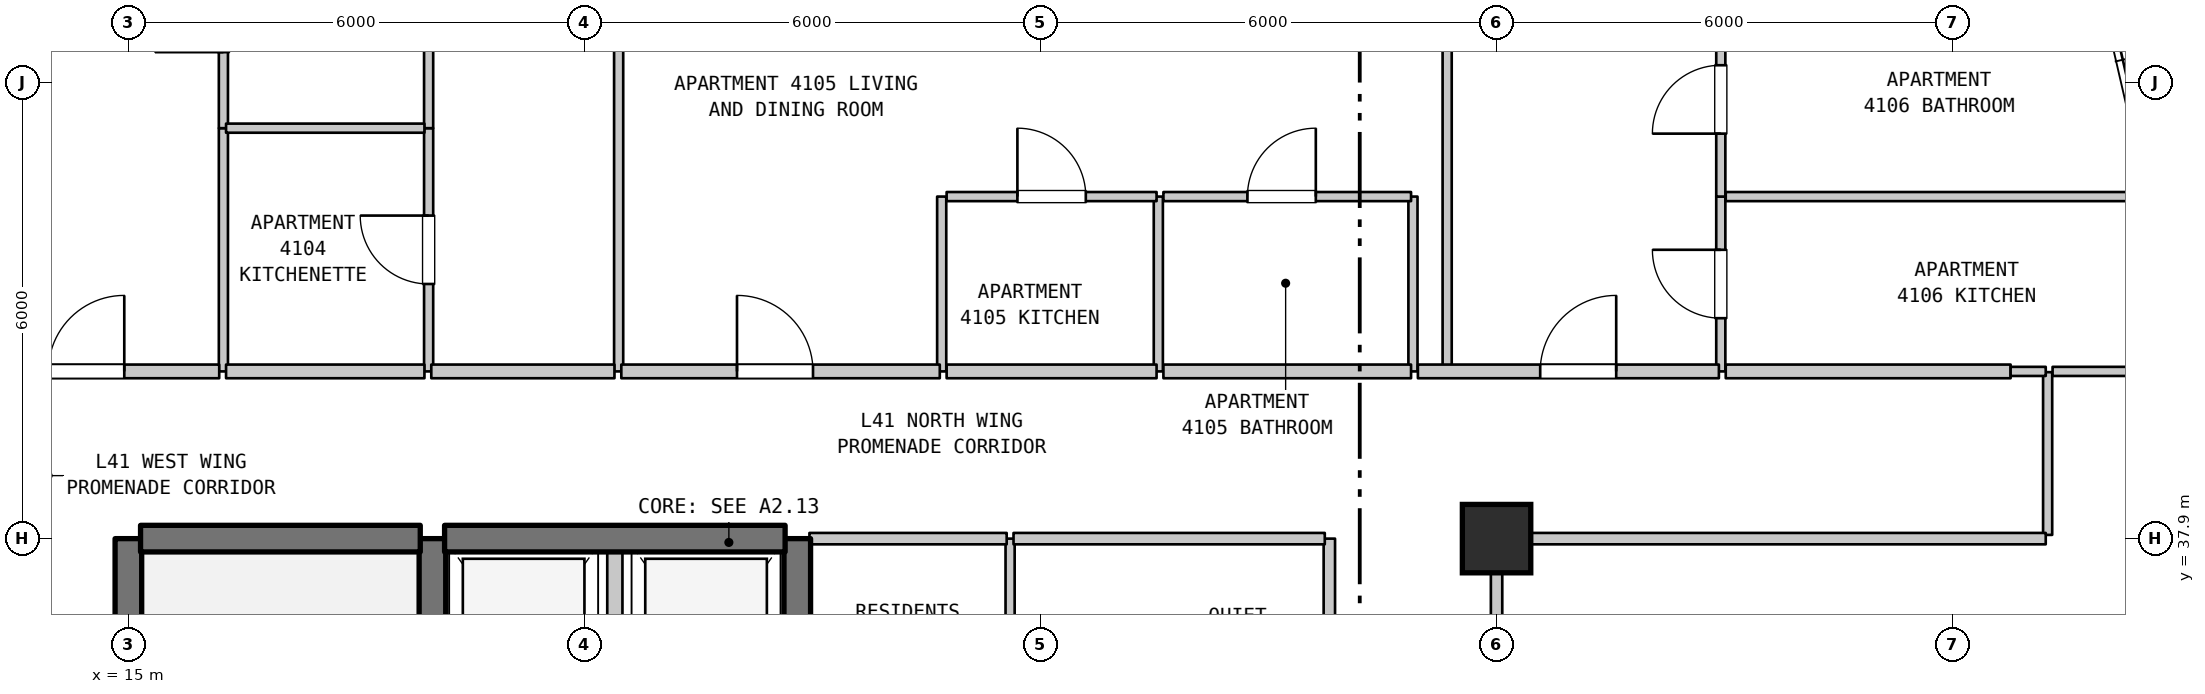
"""IFC4 building model, lengths in metres.
Left out: names, types, materials, properties, quantities, classifications, styles, units other than length and angle.
Written with IfcOpenShell. Run it as: python <this file> out.ifc"""

import sys

from ifc_helpers import new_model, si_unit, direction, frame, frame_2d, origin, origin_2d, place, context, subcontext, project, spatial, rectangle, extrude, element, fill, save


model = new_model("IFC4")
c1 = context("Model", 3, precision=1e-05, world=origin(), true_north=direction((0.0, 1.0)))
c2 = subcontext(c1, "Body", "Model", "MODEL_VIEW")
j1 = project(units=[si_unit("LENGTHUNIT", "METRE"), si_unit("PLANEANGLEUNIT", "RADIAN")], contexts=[c1])
p1 = place(None, origin())
s1 = spatial("IfcSite", under=j1, at=p1, CompositionType="ELEMENT")
p2 = place(p1, origin())
s2 = spatial("IfcBuilding", under=s1, at=p2, CompositionType="ELEMENT")
p3 = place(p2, frame((0.0, 0.0, 169.1)))
s3 = spatial("IfcBuildingStorey", under=s2, at=p3, CompositionType="ELEMENT", Elevation=169.1)
p4 = place(p3, frame((33.0, 37.9, 0.0), z_axis=(0.0, 0.0, 1.0), x_axis=(1.0, 0.0, 0.0)))
e1 = element("IfcColumn", 1, at=p4, inside=s3, PredefinedType="COLUMN", context=c2, shape_type="SweptSolid", body=[
    extrude(rectangle(XDim=0.9, YDim=0.9, at=origin_2d()), origin(), (0.0, 0.0, 1.0), 3.7),
])
p5 = place(p3, frame((15.0, 31.1, 0.0), z_axis=(0.0, 0.0, 1.0), x_axis=(0.0, 1.0, 0.0)))
e2 = element("IfcWall", 2, at=p5, inside=s3, PredefinedType="SHEAR", context=c2, shape_type="SweptSolid", body=[
    extrude(rectangle(XDim=6.8, YDim=0.35, at=frame_2d((3.4, 0.0))), origin(), (0.0, 0.0, 1.0), 3.39),
])
p6 = place(p3, frame((16.25, 40.1, 0.0), z_axis=(0.0, 0.0, 1.0), x_axis=(0.0, 1.0, 0.0)))
e3 = element("IfcWall", 3, at=p6, inside=s3, PredefinedType="PARTITIONING", context=c2, shape_type="SweptSolid", body=[
    extrude(rectangle(XDim=3.2, YDim=0.12, at=frame_2d((1.6, 0.0))), origin(), (0.0, 0.0, 1.0), 3.39),
])
p7 = place(p3, frame((16.25, 43.3, 0.0), z_axis=(0.0, 0.0, 1.0), x_axis=(0.0, 1.0, 0.0)))
e4 = element("IfcWall", 4, at=p7, inside=s3, PredefinedType="PARTITIONING", context=c2, shape_type="SweptSolid", body=[
    extrude(rectangle(XDim=2.9, YDim=0.12, at=frame_2d((1.45, 0.0))), origin(), (0.0, 0.0, 1.0), 3.39),
])
p8 = place(p7, frame((1.0, 0.0, 0.0)))
e5 = element("IfcOpeningElement", 5, at=p8, cuts=e4, PredefinedType="OPENING", context=c2, shape_type="SweptSolid", body=[
    extrude(rectangle(XDim=0.9, YDim=2.1, at=frame_2d((0.45, 1.05))), frame((0.0, 0.07, 0.0), z_axis=(0.0, -1.0, 0.0), x_axis=(1.0, 0.0, 0.0)), (0.0, 0.0, 1.0), 0.14),
])
p9 = place(p3, frame((18.95, 40.1, 0.0), z_axis=(0.0, 0.0, 1.0), x_axis=(0.0, 1.0, 0.0)))
e6 = element("IfcWall", 6, at=p9, inside=s3, PredefinedType="PARTITIONING", context=c2, shape_type="SweptSolid", body=[
    extrude(rectangle(XDim=3.2, YDim=0.12, at=frame_2d((1.6, 0.0))), origin(), (0.0, 0.0, 1.0), 3.39),
])
p10 = place(p9, frame((1.15, 0.0, 0.0)))
e7 = element("IfcOpeningElement", 7, at=p10, cuts=e6, PredefinedType="OPENING", context=c2, shape_type="SweptSolid", body=[
    extrude(rectangle(XDim=0.9, YDim=2.15, at=frame_2d((0.45, 1.075))), frame((0.0, 0.07, 0.0), z_axis=(0.0, -1.0, 0.0), x_axis=(1.0, 0.0, 0.0)), (0.0, 0.0, 1.0), 0.14),
])
p11 = place(p3, frame((18.95, 43.3, 0.0), z_axis=(0.0, 0.0, 1.0), x_axis=(0.0, 1.0, 0.0)))
e8 = element("IfcWall", 8, at=p11, inside=s3, PredefinedType="PARTITIONING", context=c2, shape_type="SweptSolid", body=[
    extrude(rectangle(XDim=2.9, YDim=0.12, at=frame_2d((1.45, 0.0))), origin(), (0.0, 0.0, 1.0), 3.39),
])
p12 = place(p3, frame((19.0, 35.0, 0.0), z_axis=(0.0, 0.0, 1.0), x_axis=(0.0, 1.0, 0.0)))
e9 = element("IfcWall", 9, at=p12, inside=s3, PredefinedType="SHEAR", context=c2, shape_type="SweptSolid", body=[
    extrude(rectangle(XDim=2.9, YDim=0.35, at=frame_2d((1.45, 0.0))), origin(), (0.0, 0.0, 1.0), 3.39),
])
p13 = place(p3, frame((21.4, 35.0, 0.0), z_axis=(0.0, 0.0, 1.0), x_axis=(0.0, 1.0, 0.0)))
e10 = element("IfcWall", 10, at=p13, inside=s3, PredefinedType="STANDARD", context=c2, shape_type="SweptSolid", body=[
    extrude(rectangle(XDim=2.9, YDim=0.2, at=frame_2d((1.45, 0.0))), origin(), (0.0, 0.0, 1.0), 3.39),
])
p14 = place(p3, frame((21.45, 40.1, 0.0), z_axis=(0.0, 0.0, 1.0), x_axis=(0.0, 1.0, 0.0)))
e11 = element("IfcWall", 11, at=p14, inside=s3, PredefinedType="PARTITIONING", context=c2, shape_type="SweptSolid", body=[
    extrude(rectangle(XDim=13.79, YDim=0.12, at=frame_2d((6.895, 0.0))), origin(), (0.0, 0.0, 1.0), 3.39),
])
p15 = place(p3, frame((23.8, 35.0, 0.0), z_axis=(0.0, 0.0, 1.0), x_axis=(0.0, 1.0, 0.0)))
e12 = element("IfcWall", 12, at=p15, inside=s3, PredefinedType="SHEAR", context=c2, shape_type="SweptSolid", body=[
    extrude(rectangle(XDim=2.9, YDim=0.35, at=frame_2d((1.45, 0.0))), origin(), (0.0, 0.0, 1.0), 3.39),
])
p16 = place(p3, frame((25.7, 40.1, 0.0), z_axis=(0.0, 0.0, 1.0), x_axis=(0.0, 1.0, 0.0)))
e13 = element("IfcWall", 13, at=p16, inside=s3, PredefinedType="PARTITIONING", context=c2, shape_type="SweptSolid", body=[
    extrude(rectangle(XDim=2.3, YDim=0.12, at=frame_2d((1.15, 0.0))), origin(), (0.0, 0.0, 1.0), 3.39),
])
p17 = place(p3, frame((26.6, 35.0, 0.0), z_axis=(0.0, 0.0, 1.0), x_axis=(0.0, 1.0, 0.0)))
e14 = element("IfcWall", 14, at=p17, inside=s3, PredefinedType="PARTITIONING", context=c2, shape_type="SweptSolid", body=[
    extrude(rectangle(XDim=2.9, YDim=0.12, at=frame_2d((1.45, 0.0))), origin(), (0.0, 0.0, 1.0), 3.39),
])
p18 = place(p3, frame((28.55, 40.1, 0.0), z_axis=(0.0, 0.0, 1.0), x_axis=(0.0, 1.0, 0.0)))
e15 = element("IfcWall", 15, at=p18, inside=s3, PredefinedType="PARTITIONING", context=c2, shape_type="SweptSolid", body=[
    extrude(rectangle(XDim=2.3, YDim=0.12, at=frame_2d((1.15, 0.0))), origin(), (0.0, 0.0, 1.0), 3.39),
])
p19 = place(p3, frame((30.8, 35.0, 0.0), z_axis=(0.0, 0.0, 1.0), x_axis=(0.0, 1.0, 0.0)))
e16 = element("IfcWall", 16, at=p19, inside=s3, PredefinedType="STANDARD", context=c2, shape_type="SweptSolid", body=[
    extrude(rectangle(XDim=2.9, YDim=0.15, at=frame_2d((1.45, 0.0))), origin(), (0.0, 0.0, 1.0), 3.39),
])
p20 = place(p3, frame((31.9, 40.1, 0.0), z_axis=(0.0, 0.0, 1.0), x_axis=(0.0, 1.0, 0.0)))
e17 = element("IfcWall", 17, at=p20, inside=s3, PredefinedType="PARTITIONING", context=c2, shape_type="SweptSolid", body=[
    extrude(rectangle(XDim=2.3, YDim=0.12, at=frame_2d((1.15, 0.0))), origin(), (0.0, 0.0, 1.0), 3.39),
])
p21 = place(p3, frame((32.35, 40.1, 0.0), z_axis=(0.0, 0.0, 1.0), x_axis=(0.0, 1.0, 0.0)))
e18 = element("IfcWall", 18, at=p21, inside=s3, PredefinedType="PARTITIONING", context=c2, shape_type="SweptSolid", body=[
    extrude(rectangle(XDim=13.79, YDim=0.12, at=frame_2d((6.895, 0.0))), origin(), (0.0, 0.0, 1.0), 3.39),
])
p22 = place(p3, frame((35.95, 40.1, 0.0), z_axis=(0.0, 0.0, 1.0), x_axis=(0.0, 1.0, 0.0)))
e19 = element("IfcWall", 19, at=p22, inside=s3, PredefinedType="PARTITIONING", context=c2, shape_type="SweptSolid", body=[
    extrude(rectangle(XDim=2.3, YDim=0.12, at=frame_2d((1.15, 0.0))), origin(), (0.0, 0.0, 1.0), 3.39),
])
p23 = place(p22, frame((0.7, 0.0, 0.0)))
e20 = element("IfcOpeningElement", 20, at=p23, cuts=e19, PredefinedType="OPENING", context=c2, shape_type="SweptSolid", body=[
    extrude(rectangle(XDim=0.9, YDim=2.15, at=frame_2d((0.45, 1.075))), frame((0.0, 0.07, 0.0), z_axis=(0.0, -1.0, 0.0), x_axis=(1.0, 0.0, 0.0)), (0.0, 0.0, 1.0), 0.14),
])
p24 = place(p3, frame((35.95, 42.4, 0.0), z_axis=(0.0, 0.0, 1.0), x_axis=(0.0, 1.0, 0.0)))
e21 = element("IfcWall", 21, at=p24, inside=s3, PredefinedType="PARTITIONING", context=c2, shape_type="SweptSolid", body=[
    extrude(rectangle(XDim=2.7, YDim=0.12, at=frame_2d((1.35, 0.0))), origin(), (0.0, 0.0, 1.0), 3.39),
])
p25 = place(p24, frame((0.828, 0.0, 0.0)))
e22 = element("IfcOpeningElement", 22, at=p25, cuts=e21, PredefinedType="OPENING", context=c2, shape_type="SweptSolid", body=[
    extrude(rectangle(XDim=0.9, YDim=2.1, at=frame_2d((0.45, 1.05))), frame((0.0, 0.07, 0.0), z_axis=(0.0, -1.0, 0.0), x_axis=(1.0, 0.0, 0.0)), (0.0, 0.0, 1.0), 0.14),
])
p26 = place(p3, frame((40.25, 37.949, 0.0), z_axis=(0.0, 0.0, 1.0), x_axis=(0.0, 1.0, 0.0)))
e23 = element("IfcWall", 23, at=p26, inside=s3, PredefinedType="PARTITIONING", context=c2, shape_type="SweptSolid", body=[
    extrude(rectangle(XDim=2.141, YDim=0.12, at=frame_2d((1.071, 0.0))), origin(), (0.0, 0.0, 1.0), 3.39),
])
p27 = place(p3, frame((15.16, 37.9, 0.0), z_axis=(0.0, 0.0, 1.0), x_axis=(1.0, 0.0, 0.0)))
e24 = element("IfcWall", 24, at=p27, inside=s3, PredefinedType="SHEAR", context=c2, shape_type="SweptSolid", body=[
    extrude(rectangle(XDim=3.68, YDim=0.35, at=frame_2d((1.84, 0.0))), origin(), (0.0, 0.0, 1.0), 3.39),
])
p28 = place(p3, frame((19.16, 37.9, 0.0), z_axis=(0.0, 0.0, 1.0), x_axis=(1.0, 0.0, 0.0)))
e25 = element("IfcWall", 25, at=p28, inside=s3, PredefinedType="SHEAR", context=c2, shape_type="SweptSolid", body=[
    extrude(rectangle(XDim=4.48, YDim=0.35, at=frame_2d((2.24, 0.0))), origin(), (0.0, 0.0, 1.0), 3.39),
])
p29 = place(p3, frame((23.96, 37.9, 0.0), z_axis=(0.0, 0.0, 1.0), x_axis=(1.0, 0.0, 0.0)))
e26 = element("IfcWall", 26, at=p29, inside=s3, PredefinedType="STANDARD", context=c2, shape_type="SweptSolid", body=[
    extrude(rectangle(XDim=2.595, YDim=0.15, at=frame_2d((1.297, 0.0))), origin(), (0.0, 0.0, 1.0), 2.89),
])
p30 = place(p3, frame((26.645, 37.9, 0.0), z_axis=(0.0, 0.0, 1.0), x_axis=(1.0, 0.0, 0.0)))
e27 = element("IfcWall", 27, at=p30, inside=s3, PredefinedType="STANDARD", context=c2, shape_type="SweptSolid", body=[
    extrude(rectangle(XDim=4.095, YDim=0.15, at=frame_2d((2.047, 0.0))), origin(), (0.0, 0.0, 1.0), 2.89),
])
p31 = place(p3, frame((33.07, 37.9, 0.0), z_axis=(0.0, 0.0, 1.0), x_axis=(1.0, 0.0, 0.0)))
e28 = element("IfcWall", 28, at=p31, inside=s3, PredefinedType="STANDARD", context=c2, shape_type="SweptSolid", body=[
    extrude(rectangle(XDim=7.155, YDim=0.15, at=frame_2d((3.578, 0.0))), origin(), (0.0, 0.0, 1.0), 3.39),
])
p32 = place(p3, frame((12.875, 40.1, 0.0), z_axis=(0.0, 0.0, 1.0), x_axis=(1.0, 0.0, 0.0)))
e29 = element("IfcWall", 29, at=p32, inside=s3, PredefinedType="STANDARD", context=c2, shape_type="SweptSolid", body=[
    extrude(rectangle(XDim=3.32, YDim=0.18, at=frame_2d((1.66, 0.0))), origin(), (0.0, 0.0, 1.0), 3.39),
])
p33 = place(p32, frame((1.071, 0.0, 0.0)))
e30 = element("IfcOpeningElement", 30, at=p33, cuts=e29, PredefinedType="OPENING", context=c2, shape_type="SweptSolid", body=[
    extrude(rectangle(XDim=1.0, YDim=2.15, at=frame_2d((0.5, 1.075))), frame((0.0, 0.1, 0.0), z_axis=(0.0, -1.0, 0.0), x_axis=(1.0, 0.0, 0.0)), (0.0, 0.0, 1.0), 0.2),
])
p34 = place(p3, frame((16.285, 40.1, 0.0), z_axis=(0.0, 0.0, 1.0), x_axis=(1.0, 0.0, 0.0)))
e31 = element("IfcWall", 31, at=p34, inside=s3, PredefinedType="STANDARD", context=c2, shape_type="SweptSolid", body=[
    extrude(rectangle(XDim=2.61, YDim=0.18, at=frame_2d((1.305, 0.0))), origin(), (0.0, 0.0, 1.0), 3.39),
])
p35 = place(p3, frame((18.985, 40.1, 0.0), z_axis=(0.0, 0.0, 1.0), x_axis=(1.0, 0.0, 0.0)))
e32 = element("IfcWall", 32, at=p35, inside=s3, PredefinedType="STANDARD", context=c2, shape_type="SweptSolid", body=[
    extrude(rectangle(XDim=2.41, YDim=0.18, at=frame_2d((1.205, 0.0))), origin(), (0.0, 0.0, 1.0), 3.39),
])
p36 = place(p3, frame((21.485, 40.1, 0.0), z_axis=(0.0, 0.0, 1.0), x_axis=(1.0, 0.0, 0.0)))
e33 = element("IfcWall", 33, at=p36, inside=s3, PredefinedType="STANDARD", context=c2, shape_type="SweptSolid", body=[
    extrude(rectangle(XDim=4.19, YDim=0.18, at=frame_2d((2.095, 0.0))), origin(), (0.0, 0.0, 1.0), 3.39),
])
p37 = place(p36, frame((1.522, 0.0, 0.0)))
e34 = element("IfcOpeningElement", 34, at=p37, cuts=e33, PredefinedType="OPENING", context=c2, shape_type="SweptSolid", body=[
    extrude(rectangle(XDim=1.0, YDim=2.15, at=frame_2d((0.5, 1.075))), frame((0.0, 0.1, 0.0), z_axis=(0.0, -1.0, 0.0), x_axis=(1.0, 0.0, 0.0)), (0.0, 0.0, 1.0), 0.2),
])
p38 = place(p3, frame((25.765, 40.1, 0.0), z_axis=(0.0, 0.0, 1.0), x_axis=(1.0, 0.0, 0.0)))
e35 = element("IfcWall", 35, at=p38, inside=s3, PredefinedType="STANDARD", context=c2, shape_type="SweptSolid", body=[
    extrude(rectangle(XDim=2.762, YDim=0.18, at=frame_2d((1.381, 0.0))), origin(), (0.0, 0.0, 1.0), 3.39),
])
p39 = place(p3, frame((28.617, 40.1, 0.0), z_axis=(0.0, 0.0, 1.0), x_axis=(1.0, 0.0, 0.0)))
e36 = element("IfcWall", 36, at=p39, inside=s3, PredefinedType="STANDARD", context=c2, shape_type="SweptSolid", body=[
    extrude(rectangle(XDim=3.258, YDim=0.18, at=frame_2d((1.629, 0.0))), origin(), (0.0, 0.0, 1.0), 3.39),
])
p40 = place(p3, frame((31.965, 40.1, 0.0), z_axis=(0.0, 0.0, 1.0), x_axis=(1.0, 0.0, 0.0)))
e37 = element("IfcWall", 37, at=p40, inside=s3, PredefinedType="STANDARD", context=c2, shape_type="SweptSolid", body=[
    extrude(rectangle(XDim=3.96, YDim=0.18, at=frame_2d((1.98, 0.0))), origin(), (0.0, 0.0, 1.0), 3.39),
])
p41 = place(p40, frame((1.609, 0.0, 0.0)))
e38 = element("IfcOpeningElement", 38, at=p41, cuts=e37, PredefinedType="OPENING", context=c2, shape_type="SweptSolid", body=[
    extrude(rectangle(XDim=1.0, YDim=2.15, at=frame_2d((0.5, 1.075))), frame((0.0, 0.1, 0.0), z_axis=(0.0, -1.0, 0.0), x_axis=(1.0, 0.0, 0.0)), (0.0, 0.0, 1.0), 0.2),
])
p42 = place(p3, frame((36.015, 40.1, 0.0), z_axis=(0.0, 0.0, 1.0), x_axis=(1.0, 0.0, 0.0)))
e39 = element("IfcWall", 39, at=p42, inside=s3, PredefinedType="STANDARD", context=c2, shape_type="SweptSolid", body=[
    extrude(rectangle(XDim=3.748, YDim=0.18, at=frame_2d((1.874, 0.0))), origin(), (0.0, 0.0, 1.0), 3.39),
])
p43 = place(p3, frame((39.763, 40.1, 0.0), z_axis=(0.0, 0.0, 1.0), x_axis=(1.0, 0.0, 0.0)))
e40 = element("IfcWall", 40, at=p43, inside=s3, PredefinedType="PARTITIONING", context=c2, shape_type="SweptSolid", body=[
    extrude(rectangle(XDim=0.462, YDim=0.12, at=frame_2d((0.231, 0.0))), origin(), (0.0, 0.0, 1.0), 3.39),
])
p44 = place(p3, frame((40.315, 40.1, 0.0), z_axis=(0.0, 0.0, 1.0), x_axis=(1.0, 0.0, 0.0)))
e41 = element("IfcWall", 41, at=p44, inside=s3, PredefinedType="PARTITIONING", context=c2, shape_type="SweptSolid", body=[
    extrude(rectangle(XDim=1.86, YDim=0.12, at=frame_2d((0.93, 0.0))), origin(), (0.0, 0.0, 1.0), 3.39),
])
p45 = place(p3, frame((25.765, 42.4, 0.0), z_axis=(0.0, 0.0, 1.0), x_axis=(1.0, 0.0, 0.0)))
e42 = element("IfcWall", 42, at=p45, inside=s3, PredefinedType="PARTITIONING", context=c2, shape_type="SweptSolid", body=[
    extrude(rectangle(XDim=2.762, YDim=0.12, at=frame_2d((1.381, 0.0))), origin(), (0.0, 0.0, 1.0), 3.39),
])
p46 = place(p45, frame((0.931, 0.0, 0.0)))
e43 = element("IfcOpeningElement", 43, at=p46, cuts=e42, PredefinedType="OPENING", context=c2, shape_type="SweptSolid", body=[
    extrude(rectangle(XDim=0.9, YDim=2.15, at=frame_2d((0.45, 1.075))), frame((0.0, 0.07, 0.0), z_axis=(0.0, -1.0, 0.0), x_axis=(1.0, 0.0, 0.0)), (0.0, 0.0, 1.0), 0.14),
])
p47 = place(p3, frame((28.617, 42.4, 0.0), z_axis=(0.0, 0.0, 1.0), x_axis=(1.0, 0.0, 0.0)))
e44 = element("IfcWall", 44, at=p47, inside=s3, PredefinedType="PARTITIONING", context=c2, shape_type="SweptSolid", body=[
    extrude(rectangle(XDim=3.258, YDim=0.12, at=frame_2d((1.629, 0.0))), origin(), (0.0, 0.0, 1.0), 3.39),
])
p48 = place(p47, frame((1.105, 0.0, 0.0)))
e45 = element("IfcOpeningElement", 45, at=p48, cuts=e44, PredefinedType="OPENING", context=c2, shape_type="SweptSolid", body=[
    extrude(rectangle(XDim=0.9, YDim=2.1, at=frame_2d((0.45, 1.05))), frame((0.0, 0.07, 0.0), z_axis=(0.0, -1.0, 0.0), x_axis=(1.0, 0.0, 0.0)), (0.0, 0.0, 1.0), 0.14),
])
p49 = place(p3, frame((36.015, 42.4, 0.0), z_axis=(0.0, 0.0, 1.0), x_axis=(1.0, 0.0, 0.0)))
e46 = element("IfcWall", 46, at=p49, inside=s3, PredefinedType="PARTITIONING", context=c2, shape_type="SweptSolid", body=[
    extrude(rectangle(XDim=5.629, YDim=0.12, at=frame_2d((2.814, 0.0))), origin(), (0.0, 0.0, 1.0), 3.39),
])
p50 = place(p3, frame((16.285, 43.3, 0.0), z_axis=(0.0, 0.0, 1.0), x_axis=(1.0, 0.0, 0.0)))
e47 = element("IfcWall", 47, at=p50, inside=s3, PredefinedType="PARTITIONING", context=c2, shape_type="SweptSolid", body=[
    extrude(rectangle(XDim=2.61, YDim=0.12, at=frame_2d((1.305, 0.0))), origin(), (0.0, 0.0, 1.0), 3.39),
])
p51 = place(p3, frame((33.0, 27.9, 0.0), z_axis=(0.0, 0.0, 1.0), x_axis=(0.0, 1.0, 0.0)))
e48 = element("IfcWall", 48, at=p51, inside=s3, PredefinedType="STANDARD", context=c2, shape_type="SweptSolid", body=[
    extrude(rectangle(XDim=9.99, YDim=0.15, at=frame_2d((4.995, 0.0))), origin(), (0.0, 0.0, 1.0), 2.89),
])
p52 = place(p51, frame((0.722, 0.0, 0.0)))
e49 = element("IfcOpeningElement", 49, at=p52, cuts=e48, PredefinedType="OPENING", context=c2, shape_type="SweptSolid", body=[
    extrude(rectangle(XDim=1.0, YDim=2.15, at=frame_2d((0.5, 1.075))), frame((0.0, 0.085, 0.0), z_axis=(0.0, -1.0, 0.0), x_axis=(1.0, 0.0, 0.0)), (0.0, 0.0, 1.0), 0.17),
])
p53 = place(p10, origin())
e50 = element("IfcDoor", 50, at=p53, inside=s3, OperationType="SINGLE_SWING_RIGHT", PredefinedType="DOOR", context=c2, shape_type="SweptSolid", body=[
    extrude(rectangle(XDim=0.9, YDim=2.15, at=frame_2d((0.45, 1.075))), frame((0.0, 0.025, 0.0), z_axis=(0.0, -1.0, 0.0), x_axis=(1.0, 0.0, 0.0)), (0.0, 0.0, 1.0), 0.05),
])
fill(e7, e50)
p54 = place(p23, origin())
e51 = element("IfcDoor", 51, at=p54, inside=s3, OperationType="SINGLE_SWING_RIGHT", PredefinedType="DOOR", context=c2, shape_type="SweptSolid", body=[
    extrude(rectangle(XDim=0.9, YDim=2.15, at=frame_2d((0.45, 1.075))), frame((0.0, 0.025, 0.0), z_axis=(0.0, -1.0, 0.0), x_axis=(1.0, 0.0, 0.0)), (0.0, 0.0, 1.0), 0.05),
])
fill(e20, e51)
p55 = place(p25, origin())
e52 = element("IfcDoor", 52, at=p55, inside=s3, OperationType="SINGLE_SWING_LEFT", PredefinedType="DOOR", context=c2, shape_type="SweptSolid", body=[
    extrude(rectangle(XDim=0.9, YDim=2.1, at=frame_2d((0.45, 1.05))), frame((0.0, 0.025, 0.0), z_axis=(0.0, -1.0, 0.0), x_axis=(1.0, 0.0, 0.0)), (0.0, 0.0, 1.0), 0.05),
])
fill(e22, e52)
p56 = place(p33, origin())
e53 = element("IfcDoor", 53, at=p56, inside=s3, OperationType="SINGLE_SWING_RIGHT", PredefinedType="DOOR", context=c2, shape_type="SweptSolid", body=[
    extrude(rectangle(XDim=1.0, YDim=2.15, at=frame_2d((0.5, 1.075))), frame((0.0, 0.025, 0.0), z_axis=(0.0, -1.0, 0.0), x_axis=(1.0, 0.0, 0.0)), (0.0, 0.0, 1.0), 0.05),
])
fill(e30, e53)
p57 = place(p37, origin())
e54 = element("IfcDoor", 54, at=p57, inside=s3, OperationType="SINGLE_SWING_LEFT", PredefinedType="DOOR", context=c2, shape_type="SweptSolid", body=[
    extrude(rectangle(XDim=1.0, YDim=2.15, at=frame_2d((0.5, 1.075))), frame((0.0, 0.025, 0.0), z_axis=(0.0, -1.0, 0.0), x_axis=(1.0, 0.0, 0.0)), (0.0, 0.0, 1.0), 0.05),
])
fill(e34, e54)
p58 = place(p41, origin())
e55 = element("IfcDoor", 55, at=p58, inside=s3, OperationType="SINGLE_SWING_RIGHT", PredefinedType="DOOR", context=c2, shape_type="SweptSolid", body=[
    extrude(rectangle(XDim=1.0, YDim=2.15, at=frame_2d((0.5, 1.075))), frame((0.0, 0.025, 0.0), z_axis=(0.0, -1.0, 0.0), x_axis=(1.0, 0.0, 0.0)), (0.0, 0.0, 1.0), 0.05),
])
fill(e38, e55)
p59 = place(p46, origin())
e56 = element("IfcDoor", 56, at=p59, inside=s3, OperationType="SINGLE_SWING_LEFT", PredefinedType="DOOR", context=c2, shape_type="SweptSolid", body=[
    extrude(rectangle(XDim=0.9, YDim=2.15, at=frame_2d((0.45, 1.075))), frame((0.0, 0.025, 0.0), z_axis=(0.0, -1.0, 0.0), x_axis=(1.0, 0.0, 0.0)), (0.0, 0.0, 1.0), 0.05),
])
fill(e43, e56)
p60 = place(p48, origin())
e57 = element("IfcDoor", 57, at=p60, inside=s3, OperationType="SINGLE_SWING_RIGHT", PredefinedType="DOOR", context=c2, shape_type="SweptSolid", body=[
    extrude(rectangle(XDim=0.9, YDim=2.1, at=frame_2d((0.45, 1.05))), frame((0.0, 0.025, 0.0), z_axis=(0.0, -1.0, 0.0), x_axis=(1.0, 0.0, 0.0)), (0.0, 0.0, 1.0), 0.05),
])
fill(e45, e57)
save(model, sys.argv[1])
